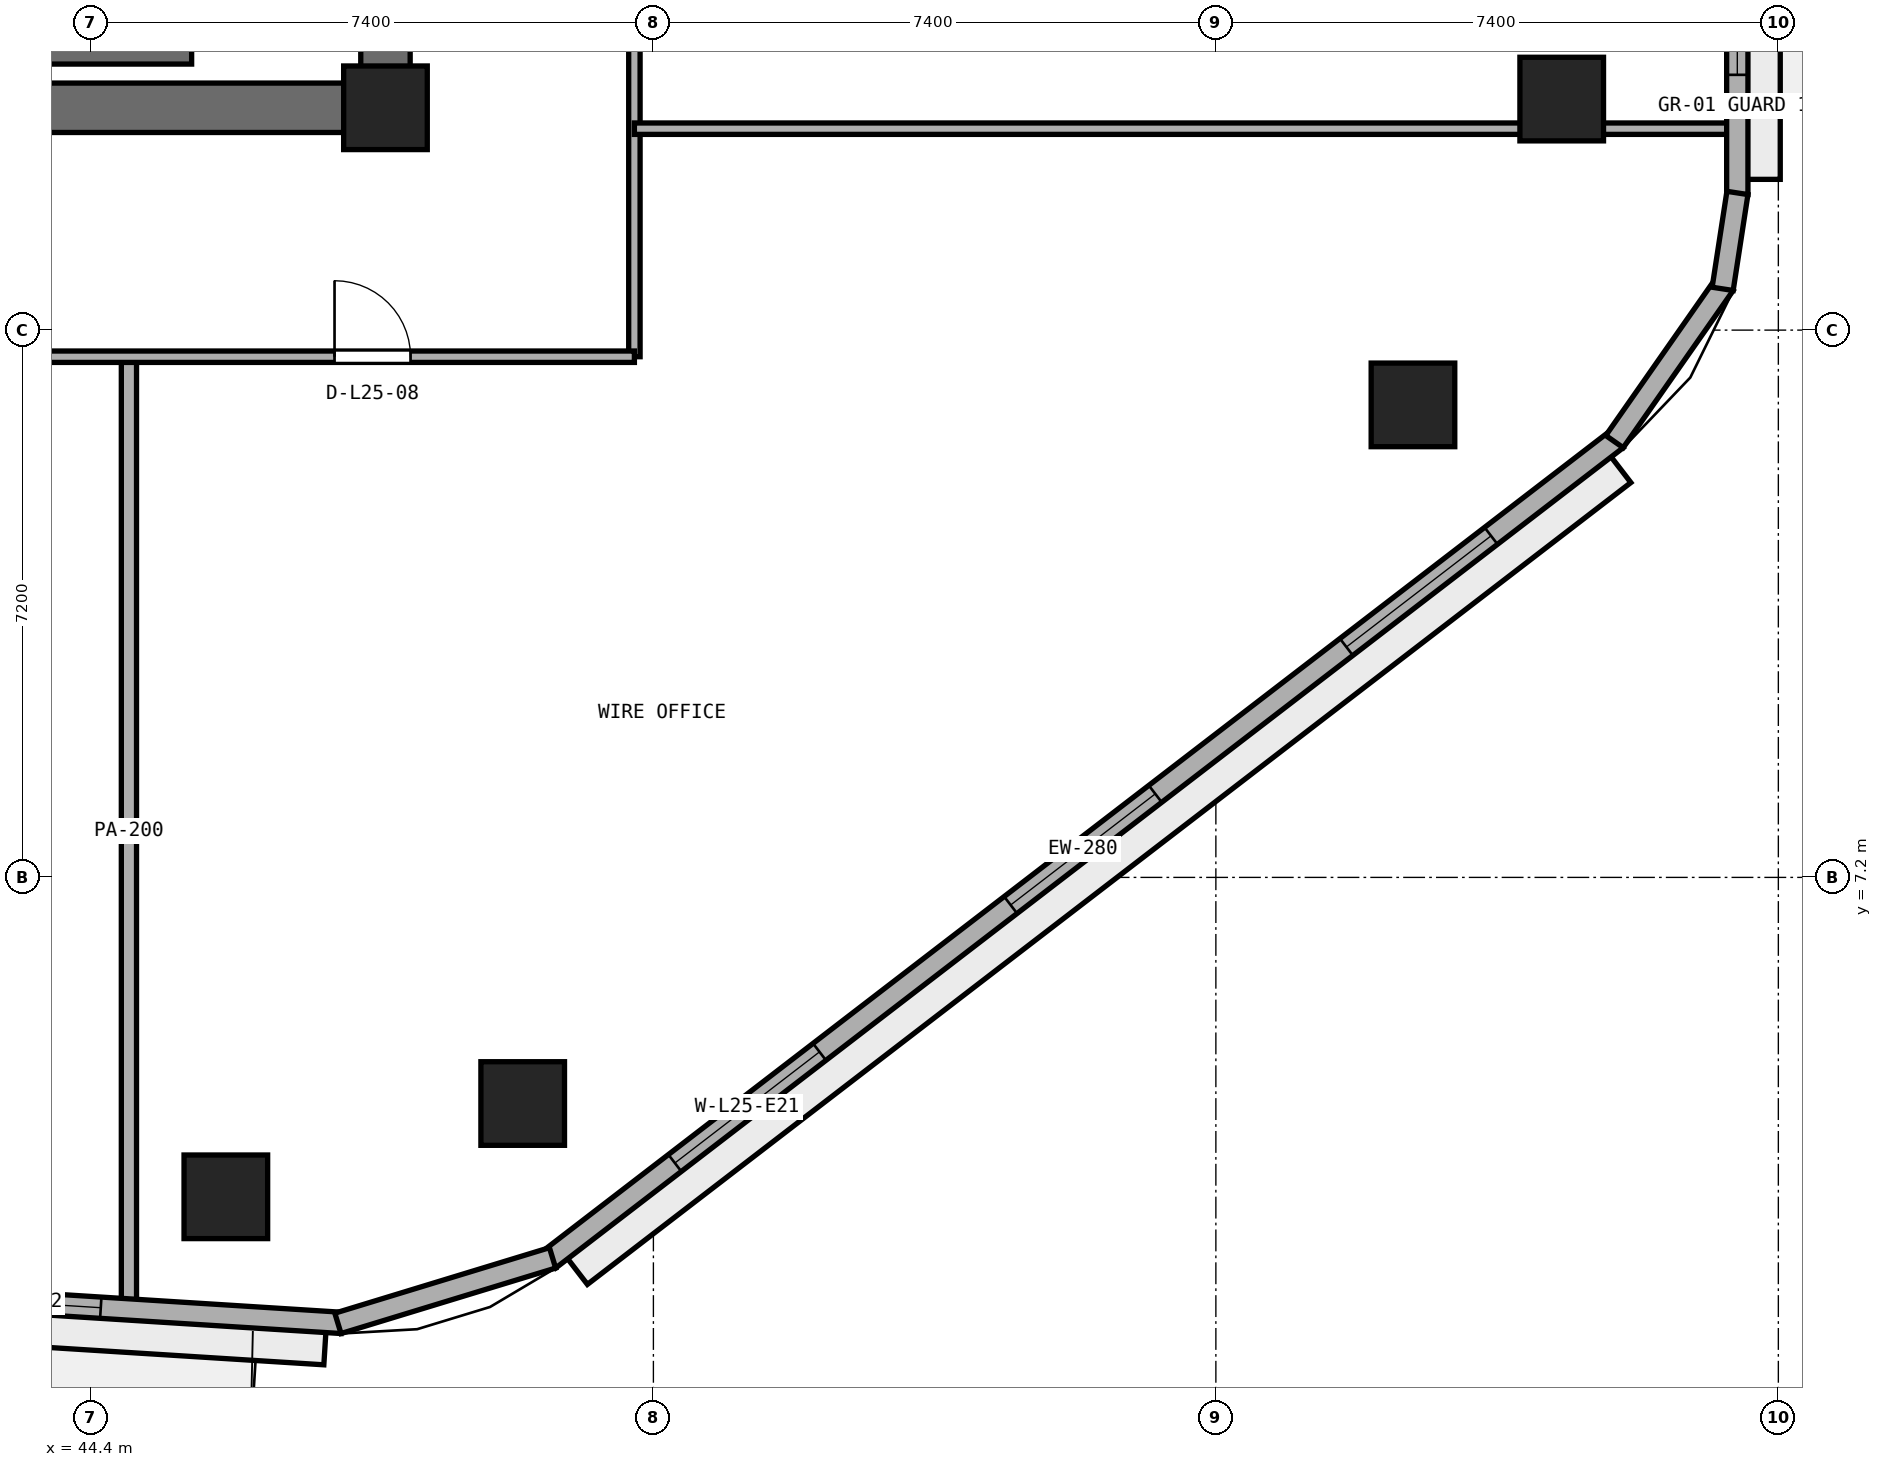
"""IFC4 building model, lengths in metres.
Left out: names, types, materials, properties, quantities, classifications, styles, units other than length and angle.
Written with IfcOpenShell. Run it as: python <this file> out.ifc"""

import sys

from ifc_helpers import new_model, si_unit, direction, frame, frame_2d, origin, origin_2d, place, context, subcontext, project, spatial, rectangle, extrude, element, fill, save


model = new_model("IFC4")
c1 = context("Model", 3, precision=1e-05, world=origin(), true_north=direction((0.0, 1.0)))
c2 = subcontext(c1, "Body", "Model", "MODEL_VIEW")
j1 = project(units=[si_unit("LENGTHUNIT", "METRE"), si_unit("PLANEANGLEUNIT", "RADIAN")], contexts=[c1])
p1 = place(None, origin())
s1 = spatial("IfcSite", under=j1, at=p1, CompositionType="ELEMENT")
p2 = place(p1, origin())
s2 = spatial("IfcBuilding", under=s1, at=p2, CompositionType="ELEMENT")
p3 = place(p2, frame((0.0, 0.0, 101.0)))
s3 = spatial("IfcBuildingStorey", under=s2, at=p3, CompositionType="ELEMENT", Elevation=101.0)
p4 = place(p3, frame((25.4, 17.325, 0.0), z_axis=(0.0, 0.0, 1.0), x_axis=(1.0, 0.0, 0.0)))
e1 = element("IfcWall", 1, at=p4, inside=s3, PredefinedType="SHEAR", context=c2, shape_type="SweptSolid", body=[
    extrude(rectangle(XDim=23.2, YDim=0.65, at=frame_2d((11.6, 0.0))), origin(), (0.0, 0.0, 1.0), 3.525),
])
p5 = place(p3, frame((48.275, 17.65, 0.0), z_axis=(0.0, 0.0, 1.0), x_axis=(0.0, 1.0, 0.0)))
e2 = element("IfcWall", 2, at=p5, inside=s3, PredefinedType="SHEAR", context=c2, shape_type="SweptSolid", body=[
    extrude(rectangle(XDim=15.1, YDim=0.65, at=frame_2d((7.55, 0.0))), origin(), (0.0, 0.0, 1.0), 3.525),
])
p6 = place(p5, frame((5.65, 0.0, 0.0)))
e3 = element("IfcOpeningElement", 3, at=p6, cuts=e2, PredefinedType="OPENING", context=c2, shape_type="SweptSolid", body=[
    extrude(rectangle(XDim=1.5, YDim=2.15, at=frame_2d((0.75, 1.075))), frame((0.0, 0.335, 0.0), z_axis=(0.0, -1.0, 0.0), x_axis=(1.0, 0.0, 0.0)), (0.0, 0.0, 1.0), 0.67),
])
p7 = place(p3, frame((48.275, 17.325, 0.0), z_axis=(0.0, 0.0, 1.0), x_axis=(1.0, 0.0, 0.0)))
e4 = element("IfcColumn", 4, at=p7, inside=s3, PredefinedType="PILASTER", context=c2, shape_type="SweptSolid", body=[
    extrude(rectangle(XDim=1.1, YDim=1.1, at=origin_2d()), origin(), (0.0, 0.0, 1.0), 3.8),
])
for number, where, z_axis, x_axis in (
    (5, (46.175, 2.998, 0.0), (0.0, 0.0, 1.0), (1.0, 0.0, 0.0)),
    (6, (50.081, 4.225, 0.0), (0.0, 0.0, 1.0), (1.0, 0.0, 0.0)),
    (7, (61.793, 13.416, 0.0), (0.0, 0.0, 1.0), (1.0, 0.0, 0.0)),
    (8, (63.75, 17.44, 0.0), (0.0, 0.0, 1.0), (1.0, 0.0, 0.0)),
):
    element("IfcColumn", number, at=place(p3, frame(where, z_axis=z_axis, x_axis=x_axis)), inside=s3, PredefinedType="COLUMN", context=c2, shape_type="SweptSolid", body=[
        extrude(rectangle(XDim=1.1, YDim=1.1, at=origin_2d()), origin(), (0.0, 0.0, 1.0), 3.8),
    ])
p8 = place(p3, frame((38.425, 18.025, 0.0), z_axis=(0.0, 0.0, 1.0), x_axis=(1.0, 0.0, 0.0)))
e9 = element("IfcWall", 9, at=p8, inside=s3, PredefinedType="SHEAR", context=c2, shape_type="SweptSolid", body=[
    extrude(rectangle(XDim=7.3, YDim=0.25, at=frame_2d((3.65, 0.0))), origin(), (0.0, 0.0, 1.0), 3.525),
])
p9 = place(p3, frame((51.55, 14.05, 0.0), z_axis=(0.0, 0.0, 1.0), x_axis=(0.0, 1.0, 0.0)))
e10 = element("IfcWall", 10, at=p9, inside=s3, PredefinedType="PARTITIONING", context=c2, shape_type="SweptSolid", body=[
    extrude(rectangle(XDim=22.3, YDim=0.15, at=frame_2d((11.15, 0.0))), origin(), (0.0, 0.0, 1.0), 3.525),
])
p10 = place(p9, frame((4.325, 0.0, 0.0)))
e11 = element("IfcOpeningElement", 11, at=p10, cuts=e10, PredefinedType="OPENING", context=c2, shape_type="SweptSolid", body=[
    extrude(rectangle(XDim=0.9, YDim=2.1, at=frame_2d((0.45, 1.05))), frame((0.0, 0.085, 0.0), z_axis=(0.0, -1.0, 0.0), x_axis=(1.0, 0.0, 0.0)), (0.0, 0.0, 1.0), 0.17),
])
p11 = place(p9, frame((10.05, 0.0, 0.0)))
e12 = element("IfcOpeningElement", 12, at=p11, cuts=e10, PredefinedType="OPENING", context=c2, shape_type="SweptSolid", body=[
    extrude(rectangle(XDim=1.0, YDim=2.12, at=frame_2d((0.5, 1.06))), frame((0.0, 0.085, 0.0), z_axis=(0.0, -1.0, 0.0), x_axis=(1.0, 0.0, 0.0)), (0.0, 0.0, 1.0), 0.17),
])
p12 = place(p9, frame((16.425, 0.0, 0.0)))
e13 = element("IfcOpeningElement", 13, at=p12, cuts=e10, PredefinedType="OPENING", context=c2, shape_type="SweptSolid", body=[
    extrude(rectangle(XDim=1.0, YDim=2.12, at=frame_2d((0.5, 1.06))), frame((0.0, 0.085, 0.0), z_axis=(0.0, -1.0, 0.0), x_axis=(1.0, 0.0, 0.0)), (0.0, 0.0, 1.0), 0.17),
])
p13 = place(p3, frame((44.9, 1.58, 0.0), z_axis=(0.0, 0.0, 1.0), x_axis=(0.0, 1.0, 0.0)))
e14 = element("IfcWall", 14, at=p13, inside=s3, PredefinedType="PARTITIONING", context=c2, shape_type="SweptSolid", body=[
    extrude(rectangle(XDim=12.47, YDim=0.2, at=frame_2d((6.235, 0.0))), origin(), (0.0, 0.0, 1.0), 3.525),
])
p14 = place(p3, frame((22.45, 14.05, 0.0), z_axis=(0.0, 0.0, 1.0), x_axis=(1.0, 0.0, 0.0)))
e15 = element("IfcWall", 15, at=p14, inside=s3, PredefinedType="PARTITIONING", context=c2, shape_type="SweptSolid", body=[
    extrude(rectangle(XDim=29.1, YDim=0.15, at=frame_2d((14.55, 0.0))), origin(), (0.0, 0.0, 1.0), 3.525),
])
p15 = place(p14, frame((2.345, 0.0, 0.0)))
e16 = element("IfcOpeningElement", 16, at=p15, cuts=e15, PredefinedType="OPENING", context=c2, shape_type="SweptSolid", body=[
    extrude(rectangle(XDim=1.0, YDim=2.12, at=frame_2d((0.5, 1.06))), frame((0.0, 0.085, 0.0), z_axis=(0.0, -1.0, 0.0), x_axis=(1.0, 0.0, 0.0)), (0.0, 0.0, 1.0), 0.17),
])
p16 = place(p14, frame((9.3, 0.0, 0.0)))
e17 = element("IfcOpeningElement", 17, at=p16, cuts=e15, PredefinedType="OPENING", context=c2, shape_type="SweptSolid", body=[
    extrude(rectangle(XDim=1.0, YDim=2.12, at=frame_2d((0.5, 1.06))), frame((0.0, 0.085, 0.0), z_axis=(0.0, -1.0, 0.0), x_axis=(1.0, 0.0, 0.0)), (0.0, 0.0, 1.0), 0.17),
])
p17 = place(p14, frame((17.8, 0.0, 0.0)))
e18 = element("IfcOpeningElement", 18, at=p17, cuts=e15, PredefinedType="OPENING", context=c2, shape_type="SweptSolid", body=[
    extrude(rectangle(XDim=1.0, YDim=2.12, at=frame_2d((0.5, 1.06))), frame((0.0, 0.085, 0.0), z_axis=(0.0, -1.0, 0.0), x_axis=(1.0, 0.0, 0.0)), (0.0, 0.0, 1.0), 0.17),
])
p18 = place(p14, frame((25.155, 0.0, 0.0)))
e19 = element("IfcOpeningElement", 19, at=p18, cuts=e15, PredefinedType="OPENING", context=c2, shape_type="SweptSolid", body=[
    extrude(rectangle(XDim=1.0, YDim=2.12, at=frame_2d((0.5, 1.06))), frame((0.0, 0.085, 0.0), z_axis=(0.0, -1.0, 0.0), x_axis=(1.0, 0.0, 0.0)), (0.0, 0.0, 1.0), 0.17),
])
p19 = place(p3, frame((51.55, 17.05, 0.0), z_axis=(0.0, 0.0, 1.0), x_axis=(1.0, 0.0, 0.0)))
e20 = element("IfcWall", 20, at=p19, inside=s3, PredefinedType="PARTITIONING", context=c2, shape_type="SweptSolid", body=[
    extrude(rectangle(XDim=14.445, YDim=0.15, at=frame_2d((7.223, 0.0))), origin(), (0.0, 0.0, 1.0), 3.525),
])
p20 = place(p3, frame((28.161, 2.571, 0.0), z_axis=(0.0, 0.0, 1.0), x_axis=(0.998017288298, -0.06294038654, 0.0)))
e21 = element("IfcWall", 21, at=p20, inside=s3, PredefinedType="STANDARD", context=c2, shape_type="SweptSolid", body=[
    extrude(rectangle(XDim=19.577, YDim=0.28, at=frame_2d((9.789, 0.0))), origin(), (0.0, 0.0, 1.0), 3.525),
])
p21 = place(p20, frame((9.239, 0.0, 0.0)))
e22 = element("IfcOpeningElement", 22, at=p21, cuts=e21, PredefinedType="OPENING", context=c2, shape_type="SweptSolid", body=[
    extrude(rectangle(XDim=1.1, YDim=2.2, at=frame_2d((0.55, 1.1))), frame((0.0, 0.15, 0.0), z_axis=(0.0, -1.0, 0.0), x_axis=(1.0, 0.0, 0.0)), (0.0, 0.0, 1.0), 0.3),
])
p22 = place(p20, frame((2.396, 0.0, 0.9)))
e23 = element("IfcOpeningElement", 23, at=p22, cuts=e21, PredefinedType="OPENING", context=c2, shape_type="SweptSolid", body=[
    extrude(rectangle(XDim=2.4, YDim=1.75, at=frame_2d((1.2, 0.875))), frame((0.0, 0.15, 0.0), z_axis=(0.0, -1.0, 0.0), x_axis=(1.0, 0.0, 0.0)), (0.0, 0.0, 1.0), 0.3),
])
p23 = place(p20, frame((14.001, 0.0, 0.9)))
e24 = element("IfcOpeningElement", 24, at=p23, cuts=e21, PredefinedType="OPENING", context=c2, shape_type="SweptSolid", body=[
    extrude(rectangle(XDim=2.4, YDim=1.75, at=frame_2d((1.2, 0.875))), frame((0.0, 0.15, 0.0), z_axis=(0.0, -1.0, 0.0), x_axis=(1.0, 0.0, 0.0)), (0.0, 0.0, 1.0), 0.3),
])
p24 = place(p3, frame((50.429, 2.172, 0.0), z_axis=(0.0, 0.0, 1.0), x_axis=(0.792937466367, 0.609303023488, 0.0)))
e25 = element("IfcWall", 25, at=p24, inside=s3, PredefinedType="STANDARD", context=c2, shape_type="SweptSolid", body=[
    extrude(rectangle(XDim=17.713, YDim=0.28, at=frame_2d((8.856, 0.0))), origin(), (0.0, 0.0, 1.0), 3.525),
])
p25 = place(p24, frame((2.085, 0.0, 0.9)))
e26 = element("IfcOpeningElement", 26, at=p25, cuts=e25, PredefinedType="OPENING", context=c2, shape_type="SweptSolid", body=[
    extrude(rectangle(XDim=2.4, YDim=1.75, at=frame_2d((1.2, 0.875))), frame((0.0, 0.15, 0.0), z_axis=(0.0, -1.0, 0.0), x_axis=(1.0, 0.0, 0.0)), (0.0, 0.0, 1.0), 0.3),
])
p26 = place(p24, frame((7.656, 0.0, 0.9)))
e27 = element("IfcOpeningElement", 27, at=p26, cuts=e25, PredefinedType="OPENING", context=c2, shape_type="SweptSolid", body=[
    extrude(rectangle(XDim=2.4, YDim=1.75, at=frame_2d((1.2, 0.875))), frame((0.0, 0.15, 0.0), z_axis=(0.0, -1.0, 0.0), x_axis=(1.0, 0.0, 0.0)), (0.0, 0.0, 1.0), 0.3),
])
p27 = place(p24, frame((13.227, 0.0, 0.9)))
e28 = element("IfcOpeningElement", 28, at=p27, cuts=e25, PredefinedType="OPENING", context=c2, shape_type="SweptSolid", body=[
    extrude(rectangle(XDim=2.4, YDim=1.75, at=frame_2d((1.2, 0.875))), frame((0.0, 0.15, 0.0), z_axis=(0.0, -1.0, 0.0), x_axis=(1.0, 0.0, 0.0)), (0.0, 0.0, 1.0), 0.3),
])
p28 = place(p3, frame((66.06, 16.183, 0.0), z_axis=(0.0, 0.0, 1.0), x_axis=(0.0, 1.0, 0.0)))
e29 = element("IfcWall", 29, at=p28, inside=s3, PredefinedType="STANDARD", context=c2, shape_type="SweptSolid", body=[
    extrude(rectangle(XDim=19.331, YDim=0.28, at=frame_2d((9.666, 0.0))), origin(), (0.0, 0.0, 1.0), 3.525),
])
p29 = place(p28, frame((9.115, 0.0, 0.0)))
e30 = element("IfcOpeningElement", 30, at=p29, cuts=e29, PredefinedType="OPENING", context=c2, shape_type="SweptSolid", body=[
    extrude(rectangle(XDim=1.1, YDim=2.2, at=frame_2d((0.55, 1.1))), frame((0.0, 0.15, 0.0), z_axis=(0.0, -1.0, 0.0), x_axis=(1.0, 0.0, 0.0)), (0.0, 0.0, 1.0), 0.3),
])
p30 = place(p28, frame((1.575, 0.0, 0.9)))
e31 = element("IfcOpeningElement", 31, at=p30, cuts=e29, PredefinedType="OPENING", context=c2, shape_type="SweptSolid", body=[
    extrude(rectangle(XDim=2.4, YDim=1.75, at=frame_2d((1.2, 0.875))), frame((0.0, 0.15, 0.0), z_axis=(0.0, -1.0, 0.0), x_axis=(1.0, 0.0, 0.0)), (0.0, 0.0, 1.0), 0.3),
])
p31 = place(p28, frame((14.326, 0.0, 0.9)))
e32 = element("IfcOpeningElement", 32, at=p31, cuts=e29, PredefinedType="OPENING", context=c2, shape_type="SweptSolid", body=[
    extrude(rectangle(XDim=2.4, YDim=1.75, at=frame_2d((1.2, 0.875))), frame((0.0, 0.15, 0.0), z_axis=(0.0, -1.0, 0.0), x_axis=(1.0, 0.0, 0.0)), (0.0, 0.0, 1.0), 0.3),
])
p32 = place(p3, frame((47.65, 1.333, 0.0), z_axis=(0.0, 0.0, 1.0), x_axis=(0.956461287977, 0.291859220516, 0.0)))
e33 = element("IfcWall", 33, at=p32, inside=s3, PredefinedType="STANDARD", context=c2, shape_type="SweptSolid", body=[
    extrude(rectangle(XDim=2.952, YDim=0.28, at=frame_2d((1.476, 0.0))), origin(), (0.0, 0.0, 1.0), 3.525),
])
p33 = place(p3, frame((64.444, 12.933, 0.0), z_axis=(0.0, 0.0, 1.0), x_axis=(0.573176686443, 0.819431806875, 0.0)))
e34 = element("IfcWall", 34, at=p33, inside=s3, PredefinedType="STANDARD", context=c2, shape_type="SweptSolid", body=[
    extrude(rectangle(XDim=2.524, YDim=0.28, at=frame_2d((1.262, 0.0))), origin(), (0.0, 0.0, 1.0), 3.525),
])
p34 = place(p3, frame((65.867, 14.943, 0.0), z_axis=(0.0, 0.0, 1.0), x_axis=(0.152014078361, 0.988378328364, 0.0)))
e35 = element("IfcWall", 35, at=p34, inside=s3, PredefinedType="STANDARD", context=c2, shape_type="SweptSolid", body=[
    extrude(rectangle(XDim=1.277, YDim=0.28, at=frame_2d((0.638, 0.0))), origin(), (0.0, 0.0, 1.0), 3.525),
])
p35 = place(p18, origin())
e36 = element("IfcDoor", 36, at=p35, inside=s3, OperationType="SINGLE_SWING_LEFT", PredefinedType="DOOR", context=c2, shape_type="SweptSolid", body=[
    extrude(rectangle(XDim=1.0, YDim=2.12, at=frame_2d((0.5, 1.06))), frame((0.0, 0.025, 0.0), z_axis=(0.0, -1.0, 0.0), x_axis=(1.0, 0.0, 0.0)), (0.0, 0.0, 1.0), 0.05),
])
fill(e19, e36)
p36 = place(p23, origin())
e37 = element("IfcWindow", 37, at=p36, inside=s3, PartitioningType="SINGLE_PANEL", PredefinedType="WINDOW", context=c2, shape_type="SweptSolid", body=[
    extrude(rectangle(XDim=2.4, YDim=1.75, at=frame_2d((1.2, 0.875))), frame((0.0, 0.03, 0.0), z_axis=(0.0, -1.0, 0.0), x_axis=(1.0, 0.0, 0.0)), (0.0, 0.0, 1.0), 0.06),
])
fill(e24, e37)
p37 = place(p25, origin())
e38 = element("IfcWindow", 38, at=p37, inside=s3, PartitioningType="SINGLE_PANEL", PredefinedType="WINDOW", context=c2, shape_type="SweptSolid", body=[
    extrude(rectangle(XDim=2.4, YDim=1.75, at=frame_2d((1.2, 0.875))), frame((0.0, 0.03, 0.0), z_axis=(0.0, -1.0, 0.0), x_axis=(1.0, 0.0, 0.0)), (0.0, 0.0, 1.0), 0.06),
])
fill(e26, e38)
p38 = place(p26, origin())
e39 = element("IfcWindow", 39, at=p38, inside=s3, PartitioningType="SINGLE_PANEL", PredefinedType="WINDOW", context=c2, shape_type="SweptSolid", body=[
    extrude(rectangle(XDim=2.4, YDim=1.75, at=frame_2d((1.2, 0.875))), frame((0.0, 0.03, 0.0), z_axis=(0.0, -1.0, 0.0), x_axis=(1.0, 0.0, 0.0)), (0.0, 0.0, 1.0), 0.06),
])
fill(e27, e39)
p39 = place(p27, origin())
e40 = element("IfcWindow", 40, at=p39, inside=s3, PartitioningType="SINGLE_PANEL", PredefinedType="WINDOW", context=c2, shape_type="SweptSolid", body=[
    extrude(rectangle(XDim=2.4, YDim=1.75, at=frame_2d((1.2, 0.875))), frame((0.0, 0.03, 0.0), z_axis=(0.0, -1.0, 0.0), x_axis=(1.0, 0.0, 0.0)), (0.0, 0.0, 1.0), 0.06),
])
fill(e28, e40)
p40 = place(p30, origin())
e41 = element("IfcWindow", 41, at=p40, inside=s3, PartitioningType="SINGLE_PANEL", PredefinedType="WINDOW", context=c2, shape_type="SweptSolid", body=[
    extrude(rectangle(XDim=2.4, YDim=1.75, at=frame_2d((1.2, 0.875))), frame((0.0, 0.03, 0.0), z_axis=(0.0, -1.0, 0.0), x_axis=(1.0, 0.0, 0.0)), (0.0, 0.0, 1.0), 0.06),
])
fill(e31, e41)
save(model, sys.argv[1])
